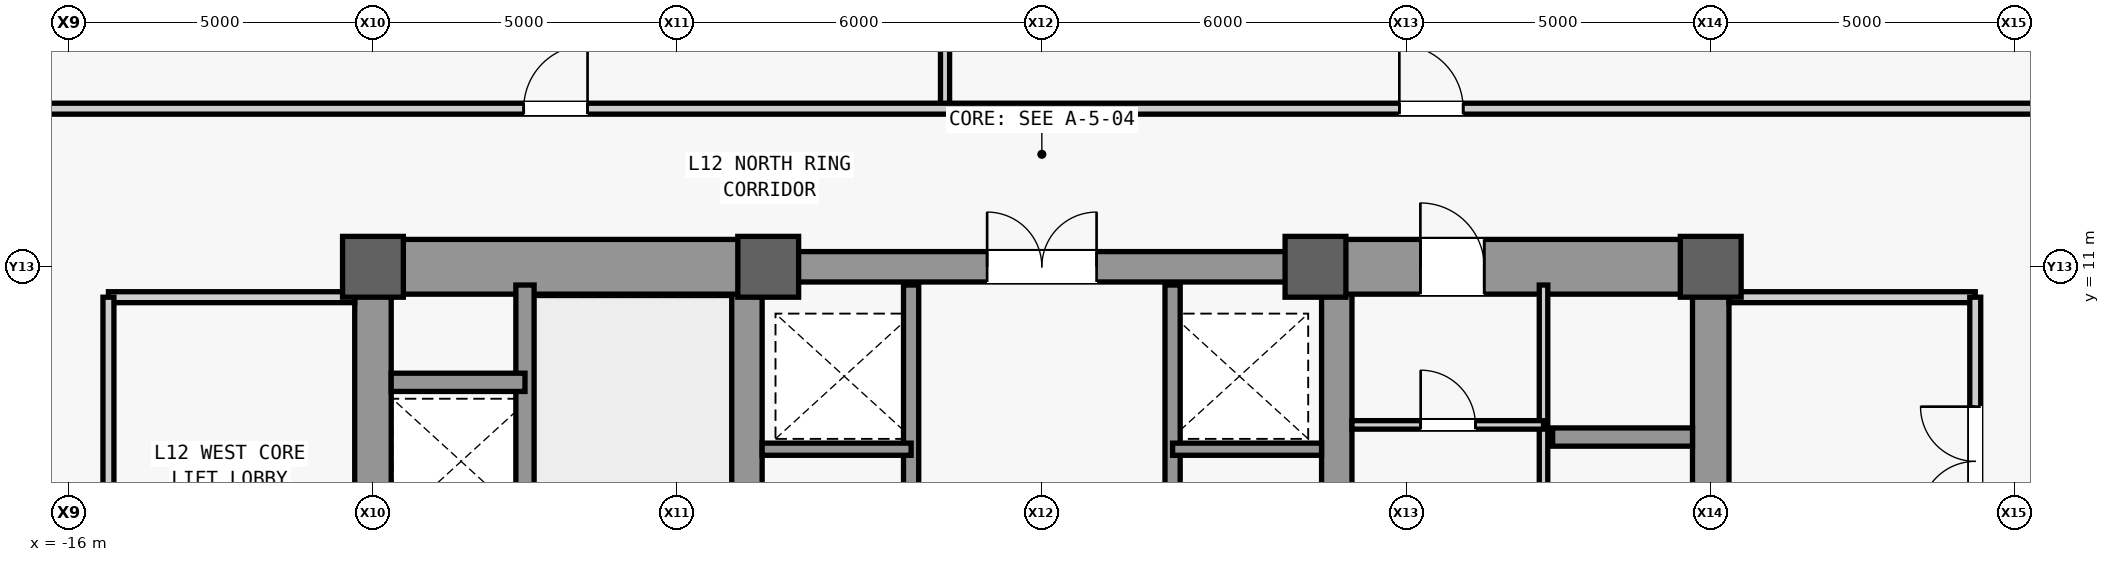
"""IFC4 building model, lengths in metres.
Left out: names, types, materials, properties, quantities, classifications, styles, units other than length and angle.
Written with IfcOpenShell. Run it as: python <this file> out.ifc"""

import sys

from ifc_helpers import new_model, si_unit, direction, frame, frame_2d, origin, origin_2d, place, context, subcontext, project, spatial, rectangle, extrude, source, transform, mapped, element, fill, save


model = new_model("IFC4")
c1 = context("Model", 3, precision=1e-05, world=origin(), true_north=direction((0.0, 1.0)))
c2 = subcontext(c1, "Body", "Model", "MODEL_VIEW")
j1 = project(units=[si_unit("LENGTHUNIT", "METRE"), si_unit("PLANEANGLEUNIT", "RADIAN")], contexts=[c1])
p1 = place(None, origin())
s1 = spatial("IfcSite", under=j1, at=p1, CompositionType="ELEMENT")
p2 = place(p1, origin())
s2 = spatial("IfcBuilding", under=s1, at=p2, CompositionType="ELEMENT")
p3 = place(p2, frame((0.0, 0.0, 57.8)))
s3 = spatial("IfcBuildingStorey", under=s2, at=p3, CompositionType="ELEMENT", Elevation=57.8)
m1 = source(origin(), c2, "Body", "SweptSolid", [
    extrude(rectangle(XDim=22.0, YDim=0.6, at=frame_2d((11.0, 0.0))), origin(), (0.0, 0.0, 1.0), 3.94),
])
p4 = place(p3, frame((-11.0, -11.0, 0.0), z_axis=(0.0, 0.0, 1.0), x_axis=(0.0, 1.0, 0.0)))
e1 = element("IfcWall", 1, at=p4, inside=s3, PredefinedType="SHEAR", context=c2, shape_type="MappedRepresentation", body=[
    mapped(m1, transform((0.0, 0.0, 0.0), scale=1.0)),
])
m2 = source(origin(), c2, "Body", "SweptSolid", [
    extrude(rectangle(XDim=1.1, YDim=2.2, at=frame_2d((0.55, 1.1))), frame((0.0, 0.31, 0.0), z_axis=(0.0, -1.0, 0.0), x_axis=(1.0, 0.0, 0.0)), (0.0, 0.0, 1.0), 0.62),
])
p5 = place(p4, frame((0.8, 0.0, 0.0)))
e2 = element("IfcOpeningElement", 2, at=p5, cuts=e1, PredefinedType="OPENING", context=c2, shape_type="MappedRepresentation", body=[
    mapped(m2, transform((0.0, 0.0, 0.0), scale=1.0)),
])
p6 = place(p4, frame((12.5, 0.0, 0.0)))
e3 = element("IfcOpeningElement", 3, at=p6, cuts=e1, PredefinedType="OPENING", context=c2, shape_type="MappedRepresentation", body=[
    mapped(m2, transform((0.0, 0.0, 0.0), scale=1.0)),
])
m3 = source(origin(), c2, "Body", "SweptSolid", [
    extrude(rectangle(XDim=0.9, YDim=2.15, at=frame_2d((0.45, 1.075))), frame((0.0, 0.31, 0.0), z_axis=(0.0, -1.0, 0.0), x_axis=(1.0, 0.0, 0.0)), (0.0, 0.0, 1.0), 0.62),
])
p7 = place(p4, frame((6.2, 0.0, 0.0)))
e4 = element("IfcOpeningElement", 4, at=p7, cuts=e1, PredefinedType="OPENING", context=c2, shape_type="MappedRepresentation", body=[
    mapped(m3, transform((0.0, 0.0, 0.0), scale=1.0)),
])
p8 = place(p4, frame((8.525, 0.0, 0.0)))
e5 = element("IfcOpeningElement", 5, at=p8, cuts=e1, PredefinedType="OPENING", context=c2, shape_type="MappedRepresentation", body=[
    mapped(m3, transform((0.0, 0.0, 0.0), scale=1.0)),
])
m4 = source(origin(), c2, "Body", "SweptSolid", [
    extrude(rectangle(XDim=1.3, YDim=2.3, at=frame_2d((0.65, 1.15))), frame((0.0, 0.31, 0.0), z_axis=(0.0, -1.0, 0.0), x_axis=(1.0, 0.0, 0.0)), (0.0, 0.0, 1.0), 0.62),
])
p9 = place(p4, frame((2.7, 0.0, 0.0)))
e6 = element("IfcOpeningElement", 6, at=p9, cuts=e1, PredefinedType="OPENING", context=c2, shape_type="MappedRepresentation", body=[
    mapped(m4, transform((0.0, 0.0, 0.0), scale=1.0)),
])
p10 = place(p3, frame((11.0, -11.0, 0.0), z_axis=(0.0, 0.0, 1.0), x_axis=(0.0, 1.0, 0.0)))
e7 = element("IfcWall", 7, at=p10, inside=s3, PredefinedType="SHEAR", context=c2, shape_type="MappedRepresentation", body=[
    mapped(m1, transform((0.0, 0.0, 0.0), scale=1.0)),
])
p11 = place(p10, frame((0.8, 0.0, 0.0)))
e8 = element("IfcOpeningElement", 8, at=p11, cuts=e7, PredefinedType="OPENING", context=c2, shape_type="MappedRepresentation", body=[
    mapped(m2, transform((0.0, 0.0, 0.0), scale=1.0)),
])
p12 = place(p10, frame((6.2, 0.0, 0.0)))
e9 = element("IfcOpeningElement", 9, at=p12, cuts=e7, PredefinedType="OPENING", context=c2, shape_type="MappedRepresentation", body=[
    mapped(m3, transform((0.0, 0.0, 0.0), scale=1.0)),
])
p13 = place(p10, frame((8.525, 0.0, 0.0)))
e10 = element("IfcOpeningElement", 10, at=p13, cuts=e7, PredefinedType="OPENING", context=c2, shape_type="MappedRepresentation", body=[
    mapped(m3, transform((0.0, 0.0, 0.0), scale=1.0)),
])
p14 = place(p10, frame((2.7, 0.0, 0.0)))
e11 = element("IfcOpeningElement", 11, at=p14, cuts=e7, PredefinedType="OPENING", context=c2, shape_type="MappedRepresentation", body=[
    mapped(m4, transform((0.0, 0.0, 0.0), scale=1.0)),
])
p15 = place(p10, frame((13.35, 0.0, 0.0)))
e12 = element("IfcOpeningElement", 12, at=p15, cuts=e7, PredefinedType="OPENING", context=c2, shape_type="MappedRepresentation", body=[
    mapped(m4, transform((0.0, 0.0, 0.0), scale=1.0)),
])
m5 = source(origin(), c2, "Body", "SweptSolid", [
    extrude(rectangle(XDim=21.4, YDim=0.5, at=frame_2d((10.7, 0.0))), origin(), (0.0, 0.0, 1.0), 3.94),
])
for number, where, z_axis, x_axis in (
    (13, (-4.85, -10.7, 0.0), (0.0, 0.0, 1.0), (0.0, 1.0, 0.0)),
    (14, (4.85, -10.7, 0.0), (0.0, 0.0, 1.0), (0.0, 1.0, 0.0)),
):
    element("IfcWall", number, at=place(p3, frame(where, z_axis=z_axis, x_axis=x_axis)), inside=s3, PredefinedType="SHEAR", context=c2, shape_type="MappedRepresentation", body=[
        mapped(m5, transform((0.0, 0.0, 0.0), scale=1.0)),
    ])
m6 = source(origin(), c2, "Body", "SweptSolid", [
    extrude(rectangle(XDim=5.85, YDim=0.9, at=frame_2d((2.925, 0.0))), origin(), (0.0, 0.0, 1.0), 3.94),
])
p16 = place(p3, frame((-10.7, 11.0, 0.0), z_axis=(0.0, 0.0, 1.0), x_axis=(1.0, 0.0, 0.0)))
e15 = element("IfcWall", 15, at=p16, inside=s3, PredefinedType="SHEAR", context=c2, shape_type="MappedRepresentation", body=[
    mapped(m6, transform((0.0, 0.0, 0.0), scale=1.0)),
])
p17 = place(p3, frame((4.85, 11.0, 0.0), z_axis=(0.0, 0.0, 1.0), x_axis=(1.0, 0.0, 0.0)))
e16 = element("IfcWall", 16, at=p17, inside=s3, PredefinedType="SHEAR", context=c2, shape_type="MappedRepresentation", body=[
    mapped(m6, transform((0.0, 0.0, 0.0), scale=1.0)),
])
m7 = source(origin(), c2, "Body", "SweptSolid", [
    extrude(rectangle(XDim=1.05, YDim=2.2, at=frame_2d((0.525, 1.1))), frame((0.0, 0.46, 0.0), z_axis=(0.0, -1.0, 0.0), x_axis=(1.0, 0.0, 0.0)), (0.0, 0.0, 1.0), 0.92),
])
p18 = place(p17, frame((1.375, 0.0, 0.0)))
e17 = element("IfcOpeningElement", 17, at=p18, cuts=e16, PredefinedType="OPENING", context=c2, shape_type="MappedRepresentation", body=[
    mapped(m7, transform((0.0, 0.0, 0.0), scale=1.0)),
])
m8 = source(origin(), c2, "Body", "SweptSolid", [
    extrude(rectangle(XDim=9.2, YDim=0.5, at=frame_2d((4.6, 0.0))), origin(), (0.0, 0.0, 1.0), 3.94),
])
p19 = place(p3, frame((-4.6, 11.0, 0.0), z_axis=(0.0, 0.0, 1.0), x_axis=(1.0, 0.0, 0.0)))
e18 = element("IfcWall", 18, at=p19, inside=s3, PredefinedType="SHEAR", context=c2, shape_type="MappedRepresentation", body=[
    mapped(m8, transform((0.0, 0.0, 0.0), scale=1.0)),
])
m9 = source(origin(), c2, "Body", "SweptSolid", [
    extrude(rectangle(XDim=1.8, YDim=2.25, at=frame_2d((0.9, 1.125))), frame((0.0, 0.26, 0.0), z_axis=(0.0, -1.0, 0.0), x_axis=(1.0, 0.0, 0.0)), (0.0, 0.0, 1.0), 0.52),
])
p20 = place(p19, frame((3.7, 0.0, 0.0)))
e19 = element("IfcOpeningElement", 19, at=p20, cuts=e18, PredefinedType="OPENING", context=c2, shape_type="MappedRepresentation", body=[
    mapped(m9, transform((0.0, 0.0, 0.0), scale=1.0)),
])
m10 = source(origin(), c2, "Body", "SweptSolid", [
    extrude(rectangle(XDim=1.0, YDim=1.0, at=origin_2d()), origin(), (0.0, 0.0, 1.0), 4.2),
])
for number, where, z_axis, x_axis in (
    (20, (-11.0, 11.0, 0.0), (0.0, 0.0, 1.0), (1.0, 0.0, 0.0)),
    (21, (-4.5, 11.0, 0.0), (0.0, 0.0, 1.0), (1.0, 0.0, 0.0)),
    (22, (4.5, 11.0, 0.0), (0.0, 0.0, 1.0), (1.0, 0.0, 0.0)),
    (23, (11.0, 11.0, 0.0), (0.0, 0.0, 1.0), (1.0, 0.0, 0.0)),
):
    element("IfcColumn", number, at=place(p3, frame(where, z_axis=z_axis, x_axis=x_axis)), inside=s3, PredefinedType="COLUMN", context=c2, shape_type="MappedRepresentation", body=[
        mapped(m10, transform((0.0, 0.0, 0.0), scale=1.0)),
    ])
m11 = source(origin(), c2, "Body", "SweptSolid", [
    extrude(rectangle(XDim=7.75, YDim=0.3, at=frame_2d((3.875, 0.0))), origin(), (0.0, 0.0, 1.0), 3.94),
])
p21 = place(p3, frame((-8.5, 2.95, 0.0), z_axis=(0.0, 0.0, 1.0), x_axis=(0.0, 1.0, 0.0)))
e24 = element("IfcWall", 24, at=p21, inside=s3, PredefinedType="SHEAR", context=c2, shape_type="MappedRepresentation", body=[
    mapped(m11, transform((0.0, 0.0, 0.0), scale=1.0)),
])
m12 = source(origin(), c2, "Body", "SweptSolid", [
    extrude(rectangle(XDim=2.2, YDim=0.3, at=frame_2d((1.1, 0.0))), origin(), (0.0, 0.0, 1.0), 3.94),
])
p22 = place(p3, frame((-10.7, 9.1, 0.0), z_axis=(0.0, 0.0, 1.0), x_axis=(1.0, 0.0, 0.0)))
e25 = element("IfcWall", 25, at=p22, inside=s3, PredefinedType="SHEAR", context=c2, shape_type="MappedRepresentation", body=[
    mapped(m12, transform((0.0, 0.0, 0.0), scale=1.0)),
])
m13 = source(origin(), c2, "Body", "SweptSolid", [
    extrude(rectangle(XDim=2.3, YDim=0.3, at=frame_2d((1.15, 0.0))), origin(), (0.0, 0.0, 1.0), 3.94),
])
p23 = place(p3, frame((8.4, 8.2, 0.0), z_axis=(0.0, 0.0, 1.0), x_axis=(1.0, 0.0, 0.0)))
e26 = element("IfcWall", 26, at=p23, inside=s3, PredefinedType="SHEAR", context=c2, shape_type="MappedRepresentation", body=[
    mapped(m13, transform((0.0, 0.0, 0.0), scale=1.0)),
])
m14 = source(origin(), c2, "Body", "SweptSolid", [
    extrude(rectangle(XDim=9.4, YDim=0.14, at=frame_2d((4.7, 0.0))), origin(), (0.0, 0.0, 1.0), 3.94),
])
p24 = place(p3, frame((8.25, 1.3, 0.0), z_axis=(0.0, 0.0, 1.0), x_axis=(0.0, 1.0, 0.0)))
e27 = element("IfcWall", 27, at=p24, inside=s3, PredefinedType="PARTITIONING", context=c2, shape_type="MappedRepresentation", body=[
    mapped(m14, transform((0.0, 0.0, 0.0), scale=1.0)),
])
m15 = source(origin(), c2, "Body", "SweptSolid", [
    extrude(rectangle(XDim=3.15, YDim=0.14, at=frame_2d((1.575, 0.0))), origin(), (0.0, 0.0, 1.0), 3.94),
])
p25 = place(p3, frame((5.1, 8.4, 0.0), z_axis=(0.0, 0.0, 1.0), x_axis=(1.0, 0.0, 0.0)))
e28 = element("IfcWall", 28, at=p25, inside=s3, PredefinedType="PARTITIONING", context=c2, shape_type="MappedRepresentation", body=[
    mapped(m15, transform((0.0, 0.0, 0.0), scale=1.0)),
])
m16 = source(origin(), c2, "Body", "SweptSolid", [
    extrude(rectangle(XDim=0.9, YDim=2.15, at=frame_2d((0.45, 1.075))), frame((0.0, 0.08, 0.0), z_axis=(0.0, -1.0, 0.0), x_axis=(1.0, 0.0, 0.0)), (0.0, 0.0, 1.0), 0.16),
])
p26 = place(p25, frame((1.13, 0.0, 0.0)))
e29 = element("IfcOpeningElement", 29, at=p26, cuts=e28, PredefinedType="OPENING", context=c2, shape_type="MappedRepresentation", body=[
    mapped(m16, transform((0.0, 0.0, 0.0), scale=1.0)),
])
m17 = source(origin(), c2, "Body", "SweptSolid", [
    extrude(rectangle(XDim=4.05, YDim=0.18, at=frame_2d((2.025, 0.0))), origin(), (0.0, 0.0, 1.0), 3.94),
])
p27 = place(p3, frame((-15.35, 10.5, 0.0), z_axis=(0.0, 0.0, 1.0), x_axis=(1.0, 0.0, 0.0)))
e30 = element("IfcWall", 30, at=p27, inside=s3, PredefinedType="PARTITIONING", context=c2, shape_type="MappedRepresentation", body=[
    mapped(m17, transform((0.0, 0.0, 0.0), scale=1.0)),
])
m18 = source(origin(), c2, "Body", "SweptSolid", [
    extrude(rectangle(XDim=16.6, YDim=0.18, at=frame_2d((8.3, 0.0))), origin(), (0.0, 0.0, 1.0), 3.94),
])
p28 = place(p3, frame((-15.35, -6.1, 0.0), z_axis=(0.0, 0.0, 1.0), x_axis=(0.0, 1.0, 0.0)))
e31 = element("IfcWall", 31, at=p28, inside=s3, PredefinedType="PARTITIONING", context=c2, shape_type="MappedRepresentation", body=[
    mapped(m18, transform((0.0, 0.0, 0.0), scale=1.0)),
])
m19 = source(origin(), c2, "Body", "SweptSolid", [
    extrude(rectangle(XDim=1.8, YDim=2.25, at=frame_2d((0.9, 1.125))), frame((0.0, 0.1, 0.0), z_axis=(0.0, -1.0, 0.0), x_axis=(1.0, 0.0, 0.0)), (0.0, 0.0, 1.0), 0.2),
])
p29 = place(p28, frame((2.7, 0.0, 0.0)))
e32 = element("IfcOpeningElement", 32, at=p29, cuts=e31, PredefinedType="OPENING", context=c2, shape_type="MappedRepresentation", body=[
    mapped(m19, transform((0.0, 0.0, 0.0), scale=1.0)),
])
p30 = place(p28, frame((11.0, 0.0, 0.0)))
e33 = element("IfcOpeningElement", 33, at=p30, cuts=e31, PredefinedType="OPENING", context=c2, shape_type="MappedRepresentation", body=[
    mapped(m19, transform((0.0, 0.0, 0.0), scale=1.0)),
])
p31 = place(p3, frame((11.3, 10.5, 0.0), z_axis=(0.0, 0.0, 1.0), x_axis=(1.0, 0.0, 0.0)))
e34 = element("IfcWall", 34, at=p31, inside=s3, PredefinedType="PARTITIONING", context=c2, shape_type="MappedRepresentation", body=[
    mapped(m17, transform((0.0, 0.0, 0.0), scale=1.0)),
])
p32 = place(p3, frame((15.35, -6.1, 0.0), z_axis=(0.0, 0.0, 1.0), x_axis=(0.0, 1.0, 0.0)))
e35 = element("IfcWall", 35, at=p32, inside=s3, PredefinedType="PARTITIONING", context=c2, shape_type="MappedRepresentation", body=[
    mapped(m18, transform((0.0, 0.0, 0.0), scale=1.0)),
])
p33 = place(p32, frame((2.7, 0.0, 0.0)))
e36 = element("IfcOpeningElement", 36, at=p33, cuts=e35, PredefinedType="OPENING", context=c2, shape_type="MappedRepresentation", body=[
    mapped(m19, transform((0.0, 0.0, 0.0), scale=1.0)),
])
p34 = place(p32, frame((13.0, 0.0, 0.0)))
e37 = element("IfcOpeningElement", 37, at=p34, cuts=e35, PredefinedType="OPENING", context=c2, shape_type="MappedRepresentation", body=[
    mapped(m19, transform((0.0, 0.0, 0.0), scale=1.0)),
])
m20 = source(origin(), c2, "Body", "SweptSolid", [
    extrude(rectangle(XDim=5.4, YDim=0.25, at=frame_2d((2.7, 0.0))), origin(), (0.0, 0.0, 1.0), 3.94),
])
for number, where, z_axis, x_axis in (
    (38, (-2.15, 5.3, 0.0), (0.0, 0.0, 1.0), (0.0, 1.0, 0.0)),
    (39, (2.15, 5.3, 0.0), (0.0, 0.0, 1.0), (0.0, 1.0, 0.0)),
):
    element("IfcWall", number, at=place(p3, frame(where, z_axis=z_axis, x_axis=x_axis)), inside=s3, PredefinedType="SHEAR", context=c2, shape_type="MappedRepresentation", body=[
        mapped(m20, transform((0.0, 0.0, 0.0), scale=1.0)),
    ])
m21 = source(origin(), c2, "Body", "SweptSolid", [
    extrude(rectangle(XDim=2.45, YDim=0.2, at=frame_2d((1.225, 0.0))), origin(), (0.0, 0.0, 1.0), 3.94),
])
for number, where, z_axis, x_axis in (
    (40, (-4.6, 8.0, 0.0), (0.0, 0.0, 1.0), (1.0, 0.0, 0.0)),
    (41, (2.15, 8.0, 0.0), (0.0, 0.0, 1.0), (1.0, 0.0, 0.0)),
):
    element("IfcWall", number, at=place(p3, frame(where, z_axis=z_axis, x_axis=x_axis)), inside=s3, PredefinedType="SHEAR", context=c2, shape_type="MappedRepresentation", body=[
        mapped(m21, transform((0.0, 0.0, 0.0), scale=1.0)),
    ])
m22 = source(origin(), c2, "Body", "SweptSolid", [
    extrude(rectangle(XDim=18.4, YDim=0.15, at=frame_2d((9.2, 0.0))), origin(), (0.0, 0.0, 1.0), 3.94),
])
p35 = place(p3, frame((-1.592, 13.6, 0.0), z_axis=(0.0, 0.0, 1.0), x_axis=(0.0, 1.0, 0.0)))
e42 = element("IfcWall", 42, at=p35, inside=s3, PredefinedType="PARTITIONING", context=c2, shape_type="MappedRepresentation", body=[
    mapped(m22, transform((0.0, 0.0, 0.0), scale=1.0)),
])
m23 = source(origin(), c2, "Body", "SweptSolid", [
    extrude(rectangle(XDim=37.1, YDim=0.18, at=frame_2d((18.55, 0.0))), origin(), (0.0, 0.0, 1.0), 3.94),
])
p36 = place(p3, frame((-19.4, 13.6, 0.0), z_axis=(0.0, 0.0, 1.0), x_axis=(1.0, 0.0, 0.0)))
e43 = element("IfcWall", 43, at=p36, inside=s3, PredefinedType="PARTITIONING", context=c2, shape_type="MappedRepresentation", body=[
    mapped(m23, transform((0.0, 0.0, 0.0), scale=1.0)),
])
m24 = source(origin(), c2, "Body", "SweptSolid", [
    extrude(rectangle(XDim=1.05, YDim=2.2, at=frame_2d((0.525, 1.1))), frame((0.0, 0.1, 0.0), z_axis=(0.0, -1.0, 0.0), x_axis=(1.0, 0.0, 0.0)), (0.0, 0.0, 1.0), 0.2),
])
p37 = place(p36, frame((10.879, 0.0, 0.0)))
e44 = element("IfcOpeningElement", 44, at=p37, cuts=e43, PredefinedType="OPENING", context=c2, shape_type="MappedRepresentation", body=[
    mapped(m24, transform((0.0, 0.0, 0.0), scale=1.0)),
])
p38 = place(p36, frame((25.279, 0.0, 0.0)))
e45 = element("IfcOpeningElement", 45, at=p38, cuts=e43, PredefinedType="OPENING", context=c2, shape_type="MappedRepresentation", body=[
    mapped(m24, transform((0.0, 0.0, 0.0), scale=1.0)),
])
m25 = source(origin(), c2, "Body", "SweptSolid", [
    extrude(rectangle(XDim=1.05, YDim=2.2, at=frame_2d((0.525, 1.1))), frame((0.0, 0.025, 0.0), z_axis=(0.0, -1.0, 0.0), x_axis=(1.0, 0.0, 0.0)), (0.0, 0.0, 1.0), 0.05),
])
p39 = place(p18, origin())
e46 = element("IfcDoor", 46, at=p39, inside=s3, OperationType="SINGLE_SWING_LEFT", PredefinedType="DOOR", context=c2, shape_type="MappedRepresentation", body=[
    mapped(m25, transform((0.0, 0.0, 0.0), scale=1.0)),
])
fill(e17, e46)
m26 = source(origin(), c2, "Body", "SweptSolid", [
    extrude(rectangle(XDim=0.9, YDim=2.15, at=frame_2d((0.45, 1.075))), frame((0.0, 0.025, 0.0), z_axis=(0.0, -1.0, 0.0), x_axis=(1.0, 0.0, 0.0)), (0.0, 0.0, 1.0), 0.05),
])
p40 = place(p26, origin())
e47 = element("IfcDoor", 47, at=p40, inside=s3, OperationType="SINGLE_SWING_LEFT", PredefinedType="DOOR", context=c2, shape_type="MappedRepresentation", body=[
    mapped(m26, transform((0.0, 0.0, 0.0), scale=1.0)),
])
fill(e29, e47)
m27 = source(origin(), c2, "Body", "SweptSolid", [
    extrude(rectangle(XDim=1.8, YDim=2.25, at=frame_2d((0.9, 1.125))), frame((0.0, 0.025, 0.0), z_axis=(0.0, -1.0, 0.0), x_axis=(1.0, 0.0, 0.0)), (0.0, 0.0, 1.0), 0.05),
])
p41 = place(p34, origin())
e48 = element("IfcDoor", 48, at=p41, inside=s3, OperationType="SINGLE_SWING_LEFT", PredefinedType="DOOR", context=c2, shape_type="MappedRepresentation", body=[
    mapped(m27, transform((0.0, 0.0, 0.0), scale=1.0)),
])
fill(e37, e48)
p42 = place(p20, origin())
e49 = element("IfcDoor", 49, at=p42, inside=s3, OperationType="SINGLE_SWING_RIGHT", PredefinedType="DOOR", context=c2, shape_type="MappedRepresentation", body=[
    mapped(m27, transform((0.0, 0.0, 0.0), scale=1.0)),
])
fill(e19, e49)
p43 = place(p37, origin())
e50 = element("IfcDoor", 50, at=p43, inside=s3, OperationType="SINGLE_SWING_RIGHT", PredefinedType="DOOR", context=c2, shape_type="MappedRepresentation", body=[
    mapped(m25, transform((0.0, 0.0, 0.0), scale=1.0)),
])
fill(e44, e50)
p44 = place(p38, origin())
e51 = element("IfcDoor", 51, at=p44, inside=s3, OperationType="SINGLE_SWING_LEFT", PredefinedType="DOOR", context=c2, shape_type="MappedRepresentation", body=[
    mapped(m25, transform((0.0, 0.0, 0.0), scale=1.0)),
])
fill(e45, e51)
save(model, sys.argv[1])
